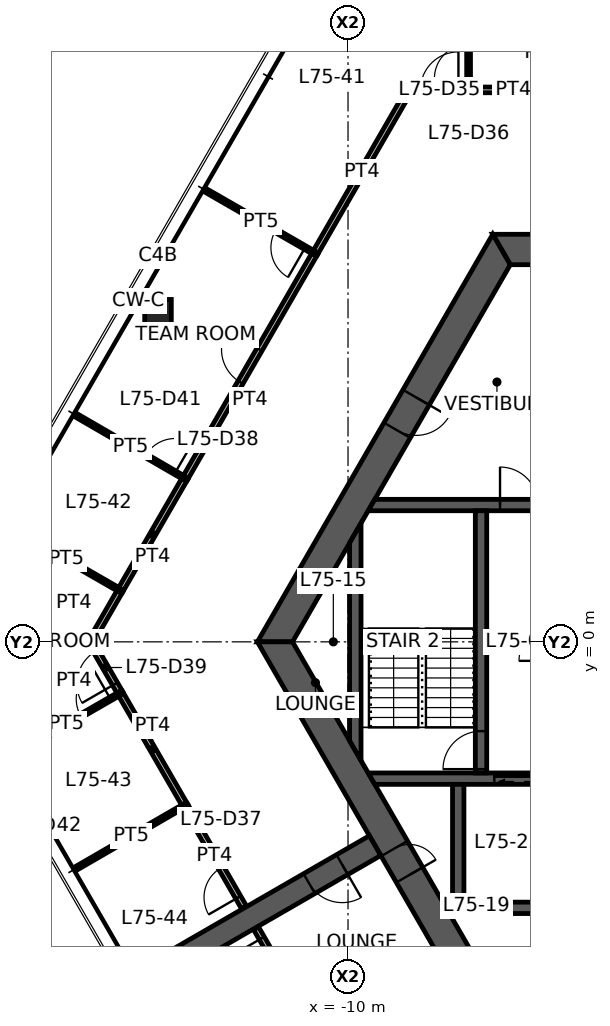
"""IFC4 building model, lengths in metres.
Left out: names, types, materials, properties, quantities, classifications, styles, units other than length and angle.
Written with IfcOpenShell. Run it as: python <this file> out.ifc"""

import sys

from ifc_helpers import new_model, si_unit, direction, frame, frame_2d, origin, origin_2d, place, context, subcontext, project, spatial, polyline, rectangle, hollow_rectangle, outline, extrude, element, fill, save


model = new_model("IFC4")
c1 = context("Model", 3, precision=1e-05, world=origin(), true_north=direction((0.0, 1.0)))
c2 = subcontext(c1, "Body", "Model", "MODEL_VIEW")
j1 = project(units=[si_unit("LENGTHUNIT", "METRE"), si_unit("PLANEANGLEUNIT", "RADIAN")], contexts=[c1])
p1 = place(None, origin())
s1 = spatial("IfcSite", under=j1, at=p1, CompositionType="ELEMENT")
p2 = place(p1, origin())
s2 = spatial("IfcBuilding", under=s1, at=p2, CompositionType="ELEMENT")
p3 = place(p2, frame((0.0, 0.0, 298.6)))
s3 = spatial("IfcBuildingStorey", under=s2, at=p3, CompositionType="ELEMENT", Elevation=298.6)
p4 = place(p3, frame((-15.0, 8.66, 0.0), z_axis=(0.0, 0.0, 1.0), x_axis=(1.0, 0.0, 0.0)))
e1 = element("IfcColumn", 1, at=p4, inside=s3, PredefinedType="COLUMN", context=c2, shape_type="SweptSolid", body=[
    extrude(hollow_rectangle(XDim=0.7, YDim=0.7, WallThickness=0.032, at=origin_2d()), origin(), (0.0, 0.0, 1.0), 3.9),
])
p5 = place(p3, frame((5.961, 10.325, 0.0), z_axis=(0.0, 0.0, 1.0), x_axis=(-1.0, 0.0, 0.0)))
e2 = element("IfcWall", 2, at=p5, inside=s3, PredefinedType="SHEAR", context=c2, shape_type="SweptSolid", body=[
    extrude(outline(polyline([(-0.231, -0.4), (4.636, -0.4), (5.536, -0.4), (6.386, -0.4), (7.286, -0.4), (12.153, -0.4), (11.691, 0.4), (7.286, 0.4), (6.386, 0.4), (5.536, 0.4), (4.636, 0.4), (0.231, 0.4), (-0.231, -0.4)])), origin(), (0.0, 0.0, 1.0), 3.9),
])
p6 = place(p5, frame((6.386, 0.0, 0.0)))
e3 = element("IfcOpeningElement", 3, at=p6, cuts=e2, PredefinedType="OPENING", context=c2, shape_type="SweptSolid", body=[
    extrude(rectangle(XDim=0.9, YDim=2.1, at=frame_2d((0.45, 1.05))), frame((0.0, 0.41, 0.0), z_axis=(0.0, -1.0, 0.0), x_axis=(1.0, 0.0, 0.0)), (0.0, 0.0, 1.0), 0.82),
])
p7 = place(p5, frame((4.636, 0.0, 0.0)))
e4 = element("IfcOpeningElement", 4, at=p7, cuts=e2, PredefinedType="OPENING", context=c2, shape_type="SweptSolid", body=[
    extrude(rectangle(XDim=0.9, YDim=2.1, at=frame_2d((0.45, 1.05))), frame((0.0, 0.41, 0.0), z_axis=(0.0, -1.0, 0.0), x_axis=(1.0, 0.0, 0.0)), (0.0, 0.0, 1.0), 0.82),
])
p8 = place(p3, frame((-5.961, 10.325, 0.0), z_axis=(0.0, 0.0, 1.0), x_axis=(-0.500004296715, -0.866022923061, 0.0)))
e5 = element("IfcWall", 5, at=p8, inside=s3, PredefinedType="SHEAR", context=c2, shape_type="SweptSolid", body=[
    extrude(outline(polyline([(-0.231, -0.4), (4.494, -0.4), (5.494, -0.4), (12.153, -0.4), (11.691, 0.4), (5.494, 0.4), (4.494, 0.4), (0.231, 0.4), (-0.231, -0.4)])), origin(), (0.0, 0.0, 1.0), 3.9),
])
p9 = place(p8, frame((4.494, 0.0, 0.0)))
e6 = element("IfcOpeningElement", 6, at=p9, cuts=e5, PredefinedType="OPENING", context=c2, shape_type="SweptSolid", body=[
    extrude(rectangle(XDim=1.0, YDim=2.1, at=frame_2d((0.5, 1.05))), frame((0.0, 0.41, 0.0), z_axis=(0.0, -1.0, 0.0), x_axis=(1.0, 0.0, 0.0)), (0.0, 0.0, 1.0), 0.82),
])
p10 = place(p3, frame((-11.922, 0.0, 0.0), z_axis=(0.0, 0.0, 1.0), x_axis=(0.500004296715, -0.866022923061, 0.0)))
e7 = element("IfcWall", 7, at=p10, inside=s3, PredefinedType="SHEAR", context=c2, shape_type="SweptSolid", body=[
    extrude(outline(polyline([(-0.231, -0.4), (6.281, -0.4), (7.081, -0.4), (12.153, -0.4), (11.691, 0.4), (7.081, 0.4), (6.281, 0.4), (0.231, 0.4), (-0.231, -0.4)])), origin(), (0.0, 0.0, 1.0), 3.9),
])
p11 = place(p10, frame((6.281, 0.0, 0.0)))
e8 = element("IfcOpeningElement", 8, at=p11, cuts=e7, PredefinedType="OPENING", context=c2, shape_type="SweptSolid", body=[
    extrude(rectangle(XDim=0.8, YDim=2.1, at=frame_2d((0.4, 1.05))), frame((0.0, 0.41, 0.0), z_axis=(0.0, -1.0, 0.0), x_axis=(1.0, 0.0, 0.0)), (0.0, 0.0, 1.0), 0.82),
])
p12 = place(p3, frame((-9.288, -5.363, 0.0), z_axis=(0.0, 0.0, 1.0), x_axis=(-0.866027473358, -0.499996415376, 0.0)))
e9 = element("IfcWall", 9, at=p12, inside=s3, PredefinedType="SHEAR", context=c2, shape_type="SweptSolid", body=[
    extrude(rectangle(XDim=7.045, YDim=0.6, at=frame_2d((3.523, 0.0))), origin(), (0.0, 0.0, 1.0), 3.9),
])
p13 = place(p12, frame((1.0, 0.0, 0.0)))
e10 = element("IfcOpeningElement", 10, at=p13, cuts=e9, PredefinedType="OPENING", context=c2, shape_type="SweptSolid", body=[
    extrude(rectangle(XDim=1.0, YDim=2.1, at=frame_2d((0.5, 1.05))), frame((0.0, 0.31, 0.0), z_axis=(0.0, -1.0, 0.0), x_axis=(1.0, 0.0, 0.0)), (0.0, 0.0, 1.0), 0.62),
])
p14 = place(p3, frame((-9.382, 3.6, 0.0), z_axis=(0.0, 0.0, 1.0), x_axis=(1.0, 0.0, 0.0)))
e11 = element("IfcWall", 11, at=p14, inside=s3, PredefinedType="SHEAR", context=c2, shape_type="SweptSolid", body=[
    extrude(outline(polyline([(-0.087, -0.15), (3.382, -0.15), (4.382, -0.15), (5.782, -0.15), (6.882, -0.15), (7.932, -0.15), (7.932, 0.15), (6.882, 0.15), (5.782, 0.15), (4.382, 0.15), (3.382, 0.15), (0.087, 0.15), (-0.087, -0.15)])), origin(), (0.0, 0.0, 1.0), 3.9),
])
p15 = place(p14, frame((3.382, 0.0, 0.0)))
e12 = element("IfcOpeningElement", 12, at=p15, cuts=e11, PredefinedType="OPENING", context=c2, shape_type="SweptSolid", body=[
    extrude(rectangle(XDim=1.0, YDim=2.1, at=frame_2d((0.5, 1.05))), frame((0.0, 0.16, 0.0), z_axis=(0.0, -1.0, 0.0), x_axis=(1.0, 0.0, 0.0)), (0.0, 0.0, 1.0), 0.32),
])
p16 = place(p14, frame((5.782, 0.0, 0.0)))
e13 = element("IfcOpeningElement", 13, at=p16, cuts=e11, PredefinedType="OPENING", context=c2, shape_type="SweptSolid", body=[
    extrude(rectangle(XDim=1.1, YDim=2.1, at=frame_2d((0.55, 1.05))), frame((0.0, 0.16, 0.0), z_axis=(0.0, -1.0, 0.0), x_axis=(1.0, 0.0, 0.0)), (0.0, 0.0, 1.0), 0.32),
])
p17 = place(p3, frame((-9.382, -3.6, 0.0), z_axis=(0.0, 0.0, 1.0), x_axis=(1.0, 0.0, 0.0)))
e14 = element("IfcWall", 14, at=p17, inside=s3, PredefinedType="SHEAR", context=c2, shape_type="SweptSolid", body=[
    extrude(outline(polyline([(0.087, -0.15), (3.232, -0.15), (4.532, -0.15), (5.782, -0.15), (6.882, -0.15), (7.932, -0.15), (7.932, 0.15), (6.882, 0.15), (5.782, 0.15), (4.532, 0.15), (3.232, 0.15), (-0.087, 0.15), (0.087, -0.15)])), origin(), (0.0, 0.0, 1.0), 3.9),
])
p18 = place(p17, frame((5.782, 0.0, 0.0)))
e15 = element("IfcOpeningElement", 15, at=p18, cuts=e14, PredefinedType="OPENING", context=c2, shape_type="SweptSolid", body=[
    extrude(rectangle(XDim=1.1, YDim=2.1, at=frame_2d((0.55, 1.05))), frame((0.0, 0.16, 0.0), z_axis=(0.0, -1.0, 0.0), x_axis=(1.0, 0.0, 0.0)), (0.0, 0.0, 1.0), 0.32),
])
p19 = place(p17, frame((3.232, 0.0, 0.0)))
e16 = element("IfcOpeningElement", 16, at=p19, cuts=e14, PredefinedType="OPENING", context=c2, shape_type="SweptSolid", body=[
    extrude(rectangle(XDim=1.3, YDim=2.1, at=frame_2d((0.65, 1.05))), frame((0.0, 0.16, 0.0), z_axis=(0.0, -1.0, 0.0), x_axis=(1.0, 0.0, 0.0)), (0.0, 0.0, 1.0), 0.32),
])
p20 = place(p3, frame((-6.5, -3.45, 0.0), z_axis=(0.0, 0.0, 1.0), x_axis=(0.0, 1.0, 0.0)))
e17 = element("IfcWall", 17, at=p20, inside=s3, PredefinedType="SHEAR", context=c2, shape_type="SweptSolid", body=[
    extrude(rectangle(XDim=6.9, YDim=0.3, at=frame_2d((3.45, 0.0))), origin(), (0.0, 0.0, 1.0), 3.9),
])
p21 = place(p20, frame((0.1, 0.0, 0.0)))
e18 = element("IfcOpeningElement", 18, at=p21, cuts=e17, PredefinedType="OPENING", context=c2, shape_type="SweptSolid", body=[
    extrude(rectangle(XDim=1.0, YDim=2.1, at=frame_2d((0.5, 1.05))), frame((0.0, 0.16, 0.0), z_axis=(0.0, -1.0, 0.0), x_axis=(1.0, 0.0, 0.0)), (0.0, 0.0, 1.0), 0.32),
])
p22 = place(p3, frame((-7.25, -7.0, 0.0), z_axis=(0.0, 0.0, 1.0), x_axis=(1.0, 0.0, 0.0)))
e19 = element("IfcWall", 19, at=p22, inside=s3, PredefinedType="SHEAR", context=c2, shape_type="SweptSolid", body=[
    extrude(rectangle(XDim=2.6, YDim=0.3, at=frame_2d((1.3, 0.0))), origin(), (0.0, 0.0, 1.0), 3.9),
])
p23 = place(p3, frame((-7.1, -3.75, 0.0), z_axis=(0.0, 0.0, 1.0), x_axis=(0.0, -1.0, 0.0)))
e20 = element("IfcWall", 20, at=p23, inside=s3, PredefinedType="SHEAR", context=c2, shape_type="SweptSolid", body=[
    extrude(rectangle(XDim=3.1, YDim=0.3, at=frame_2d((1.55, 0.0))), origin(), (0.0, 0.0, 1.0), 3.9),
])
p24 = place(p3, frame((-9.808, -2.862, 0.0), z_axis=(0.0, 0.0, 1.0), x_axis=(0.0, 1.0, 0.0)))
e21 = element("IfcWall", 21, at=p24, inside=s3, PredefinedType="SHEAR", context=c2, shape_type="SweptSolid", body=[
    extrude(outline(polyline([(-0.26, -0.15), (5.984, -0.15), (5.465, 0.15), (0.26, 0.15), (-0.26, -0.15)])), origin(), (0.0, 0.0, 1.0), 3.9),
])
p25 = place(p3, frame((-6.836, 14.525, 0.0), z_axis=(0.0, 0.0, 1.0), x_axis=(1.0, 0.0, 0.0)))
e22 = element("IfcWall", 22, at=p25, inside=s3, PredefinedType="PARTITIONING", context=c2, shape_type="SweptSolid", body=[
    extrude(rectangle(XDim=2.376, YDim=0.15, at=frame_2d((1.188, 0.0))), origin(), (0.0, 0.0, 1.0), 2.35),
])
p26 = place(p3, frame((-8.363, 14.525, 0.0), z_axis=(0.0, 0.0, 1.0), x_axis=(1.0, 0.0, 0.0)))
e23 = element("IfcWall", 23, at=p26, inside=s3, PredefinedType="PARTITIONING", context=c2, shape_type="SweptSolid", body=[
    extrude(rectangle(XDim=1.536, YDim=0.15, at=frame_2d((0.768, 0.0))), origin(), (0.0, 0.0, 1.0), 2.35),
])
p27 = place(p26, frame((0.268, 0.0, 0.0)))
e24 = element("IfcOpeningElement", 24, at=p27, cuts=e23, PredefinedType="OPENING", context=c2, shape_type="SweptSolid", body=[
    extrude(rectangle(XDim=1.0, YDim=2.1, at=frame_2d((0.5, 1.05))), frame((0.0, 0.085, 0.0), z_axis=(0.0, -1.0, 0.0), x_axis=(1.0, 0.0, 0.0)), (0.0, 0.0, 1.0), 0.17),
])
p28 = place(p3, frame((-6.826, 14.525, 0.0), z_axis=(0.0, 0.0, 1.0), x_axis=(-0.001401178566, 0.999999018349, 0.0)))
e25 = element("IfcWall", 25, at=p28, inside=s3, PredefinedType="PARTITIONING", context=c2, shape_type="SweptSolid", body=[
    extrude(rectangle(XDim=3.311, YDim=0.1, at=frame_2d((1.655, 0.0))), origin(), (0.0, 0.0, 1.0), 2.35),
])
p29 = place(p28, frame((0.3, 0.0, 0.0)))
e26 = element("IfcOpeningElement", 26, at=p29, cuts=e25, PredefinedType="OPENING", context=c2, shape_type="SweptSolid", body=[
    extrude(rectangle(XDim=0.9, YDim=2.1, at=frame_2d((0.45, 1.05))), frame((0.0, 0.06, 0.0), z_axis=(0.0, -1.0, 0.0), x_axis=(1.0, 0.0, 0.0)), (0.0, 0.0, 1.0), 0.12),
])
p30 = place(p3, frame((-10.874, 10.216, 0.0), z_axis=(0.0, 0.0, 1.0), x_axis=(0.499988457423, 0.866032067792, 0.0)))
e27 = element("IfcWall", 27, at=p30, inside=s3, PredefinedType="PARTITIONING", context=c2, shape_type="SweptSolid", body=[
    extrude(rectangle(XDim=4.952, YDim=0.15, at=frame_2d((2.476, 0.0))), origin(), (0.0, 0.0, 1.0), 2.35),
])
for number, where, z_axis, x_axis in (
    (28, (-15.997, 1.342, 0.0), (0.0, 0.0, 1.0), (0.5, 0.866, 0.0)),
    (29, (-14.284, -4.309, 0.0), (0.0, 0.0, 1.0), (-0.5, 0.866, 0.0)),
):
    element("IfcWall", number, at=place(p3, frame(where, z_axis=z_axis, x_axis=x_axis)), inside=s3, PredefinedType="PARTITIONING", context=c2, shape_type="SweptSolid", body=[
        extrude(rectangle(XDim=3.426, YDim=0.15, at=frame_2d((1.713, 0.0))), origin(), (0.0, 0.0, 1.0), 2.35),
    ])
p31 = place(p3, frame((-12.739, -6.985, 0.0), z_axis=(0.0, 0.0, 1.0), x_axis=(-0.500017819788, 0.86601511528, 0.0)))
e30 = element("IfcWall", 30, at=p31, inside=s3, PredefinedType="PARTITIONING", context=c2, shape_type="SweptSolid", body=[
    extrude(rectangle(XDim=3.101, YDim=0.15, at=frame_2d((1.55, 0.0))), origin(), (0.0, 0.0, 1.0), 2.35),
])
p32 = place(p31, frame((0.3, 0.0, 0.0)))
e31 = element("IfcOpeningElement", 31, at=p32, cuts=e30, PredefinedType="OPENING", context=c2, shape_type="SweptSolid", body=[
    extrude(rectangle(XDim=0.9, YDim=2.1, at=frame_2d((0.45, 1.05))), frame((0.0, 0.085, 0.0), z_axis=(0.0, -1.0, 0.0), x_axis=(1.0, 0.0, 0.0)), (0.0, 0.0, 1.0), 0.17),
])
p33 = place(p3, frame((-14.289, 4.301, 0.0), z_axis=(0.0, 0.0, 1.0), x_axis=(0.500020088259, 0.866013805512, 0.0)))
e32 = element("IfcWall", 32, at=p33, inside=s3, PredefinedType="PARTITIONING", context=c2, shape_type="SweptSolid", body=[
    extrude(rectangle(XDim=6.84, YDim=0.15, at=frame_2d((3.42, 0.0))), origin(), (0.0, 0.0, 1.0), 2.35),
])
p34 = place(p33, frame((2.92, 0.0, 0.0)))
e33 = element("IfcOpeningElement", 33, at=p34, cuts=e32, PredefinedType="OPENING", context=c2, shape_type="SweptSolid", body=[
    extrude(rectangle(XDim=1.0, YDim=2.1, at=frame_2d((0.5, 1.05))), frame((0.0, 0.085, 0.0), z_axis=(0.0, -1.0, 0.0), x_axis=(1.0, 0.0, 0.0)), (0.0, 0.0, 1.0), 0.17),
])
p35 = place(p3, frame((-16.772, 0.0, 0.0), z_axis=(0.0, 0.0, 1.0), x_axis=(0.500011542666, 0.866018739521, 0.0)))
e34 = element("IfcWall", 34, at=p35, inside=s3, PredefinedType="PARTITIONING", context=c2, shape_type="SweptSolid", body=[
    extrude(rectangle(XDim=1.56, YDim=0.15, at=frame_2d((0.78, 0.0))), origin(), (0.0, 0.0, 1.0), 2.35),
])
p36 = place(p3, frame((-15.992, -1.351, 0.0), z_axis=(0.0, 0.0, 1.0), x_axis=(-0.500011542666, 0.866018739521, 0.0)))
e35 = element("IfcWall", 35, at=p36, inside=s3, PredefinedType="PARTITIONING", context=c2, shape_type="SweptSolid", body=[
    extrude(rectangle(XDim=1.56, YDim=0.15, at=frame_2d((0.78, 0.0))), origin(), (0.0, 0.0, 1.0), 2.35),
])
p37 = place(p36, frame((0.28, 0.0, 0.0)))
e36 = element("IfcOpeningElement", 36, at=p37, cuts=e35, PredefinedType="OPENING", context=c2, shape_type="SweptSolid", body=[
    extrude(rectangle(XDim=1.0, YDim=2.1, at=frame_2d((0.5, 1.05))), frame((0.0, 0.085, 0.0), z_axis=(0.0, -1.0, 0.0), x_axis=(1.0, 0.0, 0.0)), (0.0, 0.0, 1.0), 0.17),
])
p38 = place(p3, frame((-10.869, 10.224, 0.0), z_axis=(0.0, 0.0, 1.0), x_axis=(-0.866757761015, 0.498729369218, 0.0)))
e37 = element("IfcWall", 37, at=p38, inside=s3, PredefinedType="PARTITIONING", context=c2, shape_type="SweptSolid", body=[
    extrude(rectangle(XDim=3.286, YDim=0.1, at=frame_2d((1.643, 0.0))), origin(), (0.0, 0.0, 1.0), 2.35),
])
p39 = place(p38, frame((0.3, 0.0, 0.0)))
e38 = element("IfcOpeningElement", 38, at=p39, cuts=e37, PredefinedType="OPENING", context=c2, shape_type="SweptSolid", body=[
    extrude(rectangle(XDim=0.9, YDim=2.1, at=frame_2d((0.45, 1.05))), frame((0.0, 0.06, 0.0), z_axis=(0.0, -1.0, 0.0), x_axis=(1.0, 0.0, 0.0)), (0.0, 0.0, 1.0), 0.12),
])
p40 = place(p3, frame((-17.154, 5.96, 0.0), z_axis=(0.0, 0.0, 1.0), x_axis=(0.865342122637, -0.501181614577, 0.0)))
e39 = element("IfcWall", 39, at=p40, inside=s3, PredefinedType="PARTITIONING", context=c2, shape_type="SweptSolid", body=[
    extrude(rectangle(XDim=3.311, YDim=0.1, at=frame_2d((1.655, 0.0))), origin(), (0.0, 0.0, 1.0), 2.35),
])
p41 = place(p40, frame((2.111, 0.0, 0.0)))
e40 = element("IfcOpeningElement", 40, at=p41, cuts=e39, PredefinedType="OPENING", context=c2, shape_type="SweptSolid", body=[
    extrude(rectangle(XDim=0.9, YDim=2.1, at=frame_2d((0.45, 1.05))), frame((0.0, 0.06, 0.0), z_axis=(0.0, -1.0, 0.0), x_axis=(1.0, 0.0, 0.0)), (0.0, 0.0, 1.0), 0.12),
])
p42 = place(p3, frame((-15.992, 1.351, 0.0), z_axis=(0.0, 0.0, 1.0), x_axis=(-0.866707153418, 0.498817311462, 0.0)))
e41 = element("IfcWall", 41, at=p42, inside=s3, PredefinedType="PARTITIONING", context=c2, shape_type="SweptSolid", body=[
    extrude(rectangle(XDim=3.286, YDim=0.1, at=frame_2d((1.643, 0.0))), origin(), (0.0, 0.0, 1.0), 2.35),
])
p43 = place(p3, frame((-14.289, -4.3, 0.0), z_axis=(0.0, 0.0, 1.0), x_axis=(-0.865245913684, -0.501347692578, 0.0)))
e42 = element("IfcWall", 42, at=p43, inside=s3, PredefinedType="PARTITIONING", context=c2, shape_type="SweptSolid", body=[
    extrude(rectangle(XDim=3.275, YDim=0.1, at=frame_2d((1.638, 0.0))), origin(), (0.0, 0.0, 1.0), 2.35),
])
p44 = place(p3, frame((-18.84, -2.99, 0.0), z_axis=(0.0, 0.0, 1.0), x_axis=(0.866707153418, 0.498817311462, 0.0)))
e43 = element("IfcWall", 43, at=p44, inside=s3, PredefinedType="PARTITIONING", context=c2, shape_type="SweptSolid", body=[
    extrude(rectangle(XDim=3.286, YDim=0.1, at=frame_2d((1.643, 0.0))), origin(), (0.0, 0.0, 1.0), 2.35),
])
p45 = place(p44, frame((2.086, 0.0, 0.0)))
e44 = element("IfcOpeningElement", 44, at=p45, cuts=e43, PredefinedType="OPENING", context=c2, shape_type="SweptSolid", body=[
    extrude(rectangle(XDim=0.9, YDim=2.1, at=frame_2d((0.45, 1.05))), frame((0.0, 0.06, 0.0), z_axis=(0.0, -1.0, 0.0), x_axis=(1.0, 0.0, 0.0)), (0.0, 0.0, 1.0), 0.12),
])
p46 = place(p3, frame((-10.869, -10.225, 0.0), z_axis=(0.0, 0.0, 1.0), x_axis=(-0.499958760481, 0.866049212123, 0.0)))
e45 = element("IfcWall", 45, at=p46, inside=s3, PredefinedType="PARTITIONING", context=c2, shape_type="SweptSolid", body=[
    extrude(rectangle(XDim=3.1, YDim=0.15, at=frame_2d((1.55, 0.0))), origin(), (0.0, 0.0, 1.0), 2.35),
])
p47 = place(p46, frame((1.9, 0.0, 0.0)))
e46 = element("IfcOpeningElement", 46, at=p47, cuts=e45, PredefinedType="OPENING", context=c2, shape_type="SweptSolid", body=[
    extrude(rectangle(XDim=0.9, YDim=2.1, at=frame_2d((0.45, 1.05))), frame((0.0, 0.085, 0.0), z_axis=(0.0, -1.0, 0.0), x_axis=(1.0, 0.0, 0.0)), (0.0, 0.0, 1.0), 0.17),
])
p48 = place(p11, origin())
e47 = element("IfcDoor", 47, at=p48, inside=s3, OperationType="SINGLE_SWING_RIGHT", PredefinedType="DOOR", context=c2, shape_type="SweptSolid", body=[
    extrude(rectangle(XDim=0.8, YDim=2.1, at=frame_2d((0.4, 1.05))), frame((0.0, 0.025, 0.0), z_axis=(0.0, -1.0, 0.0), x_axis=(1.0, 0.0, 0.0)), (0.0, 0.0, 1.0), 0.05),
])
fill(e8, e47)
p49 = place(p9, origin())
e48 = element("IfcDoor", 48, at=p49, inside=s3, OperationType="SINGLE_SWING_LEFT", PredefinedType="DOOR", context=c2, shape_type="SweptSolid", body=[
    extrude(rectangle(XDim=1.0, YDim=2.1, at=frame_2d((0.5, 1.05))), frame((0.0, 0.025, 0.0), z_axis=(0.0, -1.0, 0.0), x_axis=(1.0, 0.0, 0.0)), (0.0, 0.0, 1.0), 0.05),
])
fill(e6, e48)
p50 = place(p21, origin())
e49 = element("IfcDoor", 49, at=p50, inside=s3, OperationType="SINGLE_SWING_LEFT", PredefinedType="DOOR", context=c2, shape_type="SweptSolid", body=[
    extrude(rectangle(XDim=1.0, YDim=2.1, at=frame_2d((0.5, 1.05))), frame((0.0, 0.025, 0.0), z_axis=(0.0, -1.0, 0.0), x_axis=(1.0, 0.0, 0.0)), (0.0, 0.0, 1.0), 0.05),
])
fill(e18, e49)
p51 = place(p15, origin())
e50 = element("IfcDoor", 50, at=p51, inside=s3, OperationType="SINGLE_SWING_LEFT", PredefinedType="DOOR", context=c2, shape_type="SweptSolid", body=[
    extrude(rectangle(XDim=1.0, YDim=2.1, at=frame_2d((0.5, 1.05))), frame((0.0, 0.025, 0.0), z_axis=(0.0, -1.0, 0.0), x_axis=(1.0, 0.0, 0.0)), (0.0, 0.0, 1.0), 0.05),
])
fill(e12, e50)
p52 = place(p13, origin())
e51 = element("IfcDoor", 51, at=p52, inside=s3, OperationType="SINGLE_SWING_LEFT", PredefinedType="DOOR", context=c2, shape_type="SweptSolid", body=[
    extrude(rectangle(XDim=1.0, YDim=2.1, at=frame_2d((0.5, 1.05))), frame((0.0, 0.025, 0.0), z_axis=(0.0, -1.0, 0.0), x_axis=(1.0, 0.0, 0.0)), (0.0, 0.0, 1.0), 0.05),
])
fill(e10, e51)
p53 = place(p27, origin())
e52 = element("IfcDoor", 52, at=p53, inside=s3, OperationType="SINGLE_SWING_RIGHT", PredefinedType="DOOR", context=c2, shape_type="SweptSolid", body=[
    extrude(rectangle(XDim=1.0, YDim=2.1, at=frame_2d((0.5, 1.05))), frame((0.0, 0.025, 0.0), z_axis=(0.0, -1.0, 0.0), x_axis=(1.0, 0.0, 0.0)), (0.0, 0.0, 1.0), 0.05),
])
fill(e24, e52)
p54 = place(p29, origin())
e53 = element("IfcDoor", 53, at=p54, inside=s3, OperationType="SINGLE_SWING_LEFT", PredefinedType="DOOR", context=c2, shape_type="SweptSolid", body=[
    extrude(rectangle(XDim=0.9, YDim=2.1, at=frame_2d((0.45, 1.05))), frame((0.0, 0.025, 0.0), z_axis=(0.0, -1.0, 0.0), x_axis=(1.0, 0.0, 0.0)), (0.0, 0.0, 1.0), 0.05),
])
fill(e26, e53)
p55 = place(p32, origin())
e54 = element("IfcDoor", 54, at=p55, inside=s3, OperationType="SINGLE_SWING_LEFT", PredefinedType="DOOR", context=c2, shape_type="SweptSolid", body=[
    extrude(rectangle(XDim=0.9, YDim=2.1, at=frame_2d((0.45, 1.05))), frame((0.0, 0.025, 0.0), z_axis=(0.0, -1.0, 0.0), x_axis=(1.0, 0.0, 0.0)), (0.0, 0.0, 1.0), 0.05),
])
fill(e31, e54)
p56 = place(p34, origin())
e55 = element("IfcDoor", 55, at=p56, inside=s3, OperationType="SINGLE_SWING_RIGHT", PredefinedType="DOOR", context=c2, shape_type="SweptSolid", body=[
    extrude(rectangle(XDim=1.0, YDim=2.1, at=frame_2d((0.5, 1.05))), frame((0.0, 0.025, 0.0), z_axis=(0.0, -1.0, 0.0), x_axis=(1.0, 0.0, 0.0)), (0.0, 0.0, 1.0), 0.05),
])
fill(e33, e55)
p57 = place(p37, origin())
e56 = element("IfcDoor", 56, at=p57, inside=s3, OperationType="SINGLE_SWING_LEFT", PredefinedType="DOOR", context=c2, shape_type="SweptSolid", body=[
    extrude(rectangle(XDim=1.0, YDim=2.1, at=frame_2d((0.5, 1.05))), frame((0.0, 0.025, 0.0), z_axis=(0.0, -1.0, 0.0), x_axis=(1.0, 0.0, 0.0)), (0.0, 0.0, 1.0), 0.05),
])
fill(e36, e56)
p58 = place(p39, origin())
e57 = element("IfcDoor", 57, at=p58, inside=s3, OperationType="SINGLE_SWING_LEFT", PredefinedType="DOOR", context=c2, shape_type="SweptSolid", body=[
    extrude(rectangle(XDim=0.9, YDim=2.1, at=frame_2d((0.45, 1.05))), frame((0.0, 0.025, 0.0), z_axis=(0.0, -1.0, 0.0), x_axis=(1.0, 0.0, 0.0)), (0.0, 0.0, 1.0), 0.05),
])
fill(e38, e57)
p59 = place(p41, origin())
e58 = element("IfcDoor", 58, at=p59, inside=s3, OperationType="SINGLE_SWING_RIGHT", PredefinedType="DOOR", context=c2, shape_type="SweptSolid", body=[
    extrude(rectangle(XDim=0.9, YDim=2.1, at=frame_2d((0.45, 1.05))), frame((0.0, 0.025, 0.0), z_axis=(0.0, -1.0, 0.0), x_axis=(1.0, 0.0, 0.0)), (0.0, 0.0, 1.0), 0.05),
])
fill(e40, e58)
p60 = place(p45, origin())
e59 = element("IfcDoor", 59, at=p60, inside=s3, OperationType="SINGLE_SWING_RIGHT", PredefinedType="DOOR", context=c2, shape_type="SweptSolid", body=[
    extrude(rectangle(XDim=0.9, YDim=2.1, at=frame_2d((0.45, 1.05))), frame((0.0, 0.025, 0.0), z_axis=(0.0, -1.0, 0.0), x_axis=(1.0, 0.0, 0.0)), (0.0, 0.0, 1.0), 0.05),
])
fill(e44, e59)
p61 = place(p47, origin())
e60 = element("IfcDoor", 60, at=p61, inside=s3, OperationType="SINGLE_SWING_RIGHT", PredefinedType="DOOR", context=c2, shape_type="SweptSolid", body=[
    extrude(rectangle(XDim=0.9, YDim=2.1, at=frame_2d((0.45, 1.05))), frame((0.0, 0.025, 0.0), z_axis=(0.0, -1.0, 0.0), x_axis=(1.0, 0.0, 0.0)), (0.0, 0.0, 1.0), 0.05),
])
fill(e46, e60)
p62 = place(p19, origin())
e61 = element("IfcDoor", 61, at=p62, inside=s3, OperationType="DOUBLE_DOOR_SLIDING", PredefinedType="DOOR", context=c2, shape_type="SweptSolid", body=[
    extrude(rectangle(XDim=1.3, YDim=2.1, at=frame_2d((0.65, 1.05))), frame((0.0, 0.025, 0.0), z_axis=(0.0, -1.0, 0.0), x_axis=(1.0, 0.0, 0.0)), (0.0, 0.0, 1.0), 0.05),
])
fill(e16, e61)
save(model, sys.argv[1])
